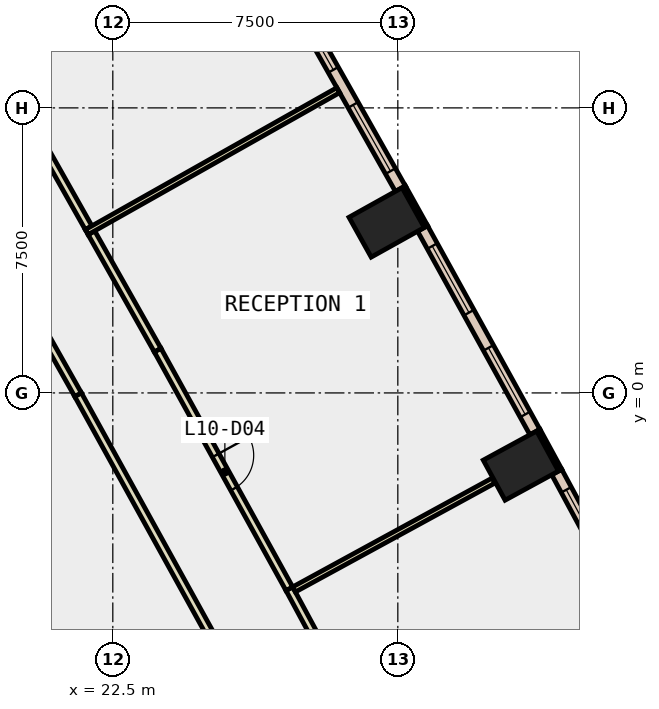
"""IFC4 building model, lengths in metres.
Left out: names, types, materials, properties, quantities, classifications, styles, units other than length and angle.
Written with IfcOpenShell. Run it as: python <this file> out.ifc"""

import sys

from ifc_helpers import new_model, si_unit, direction, frame, frame_2d, origin, origin_2d, place, context, subcontext, project, spatial, rectangle, extrude, element, fill, save


model = new_model("IFC4")
c1 = context("Model", 3, precision=1e-05, world=origin(), true_north=direction((0.0, 1.0)))
c2 = subcontext(c1, "Body", "Model", "MODEL_VIEW")
j1 = project(units=[si_unit("LENGTHUNIT", "METRE"), si_unit("PLANEANGLEUNIT", "RADIAN")], contexts=[c1])
p1 = place(None, origin())
s1 = spatial("IfcSite", under=j1, at=p1, CompositionType="ELEMENT")
p2 = place(p1, origin())
s2 = spatial("IfcBuilding", under=s1, at=p2, CompositionType="ELEMENT")
p3 = place(p2, frame((0.0, 0.0, 51.8)))
s3 = spatial("IfcBuildingStorey", under=s2, at=p3, CompositionType="ELEMENT", Elevation=51.8)
for number, where, z_axis, x_axis in (
    (1, (33.238, -1.913, -0.4), (0.0, 0.0, 1.0), (-0.478, 0.878, 0.0)),
    (2, (29.706, 4.487, -0.4), (0.0, 0.0, 1.0), (-0.487, 0.873, 0.0)),
):
    element("IfcColumn", number, at=place(p3, frame(where, z_axis=z_axis, x_axis=x_axis)), inside=s3, PredefinedType="COLUMN", context=c2, shape_type="SweptSolid", body=[
        extrude(rectangle(XDim=1.2, YDim=1.6, at=origin_2d()), origin(), (0.0, 0.0, 1.0), 4.2),
    ])
p4 = place(p3, frame((34.271, -2.034, 0.0), z_axis=(0.0, 0.0, 1.0), x_axis=(-0.478267644701, 0.878214131082, 0.0)))
e3 = element("IfcWall", 3, at=p4, inside=s3, PredefinedType="STANDARD", context=c2, shape_type="SweptSolid", body=[
    extrude(rectangle(XDim=1.2, YDim=0.1, at=frame_2d((0.6, 0.0))), origin(), (0.0, 0.0, 1.0), 3.8),
])
p5 = place(p3, frame((30.74, 4.377, 0.0), z_axis=(0.0, 0.0, 1.0), x_axis=(-0.486730996044, 0.87355190887, 0.0)))
e4 = element("IfcWall", 4, at=p5, inside=s3, PredefinedType="STANDARD", context=c2, shape_type="SweptSolid", body=[
    extrude(rectangle(XDim=1.2, YDim=0.1, at=frame_2d((0.6, 0.0))), origin(), (0.0, 0.0, 1.0), 3.8),
])
p6 = place(p3, frame((37.086, -7.47, 0.0), z_axis=(0.0, 0.0, 1.0), x_axis=(-0.474584950749, 0.880209704856, 0.0)))
e5 = element("IfcWall", 5, at=p6, inside=s3, PredefinedType="STANDARD", context=c2, shape_type="SweptSolid", body=[
    extrude(rectangle(XDim=6.121, YDim=0.3, at=frame_2d((3.061, 0.0))), origin(), (0.0, 0.0, 1.0), 3.8),
])
p7 = place(p6, frame((0.53, 0.0, 0.9)))
e6 = element("IfcOpeningElement", 6, at=p7, cuts=e5, PredefinedType="OPENING", context=c2, shape_type="SweptSolid", body=[
    extrude(rectangle(XDim=2.0, YDim=2.6, at=frame_2d((1.0, 1.3))), frame((0.0, 0.16, 0.0), z_axis=(0.0, -1.0, 0.0), x_axis=(1.0, 0.0, 0.0)), (0.0, 0.0, 1.0), 0.32),
])
p8 = place(p6, frame((3.591, 0.0, 0.9)))
e7 = element("IfcOpeningElement", 7, at=p8, cuts=e5, PredefinedType="OPENING", context=c2, shape_type="SweptSolid", body=[
    extrude(rectangle(XDim=2.0, YDim=2.6, at=frame_2d((1.0, 1.3))), frame((0.0, 0.16, 0.0), z_axis=(0.0, -1.0, 0.0), x_axis=(1.0, 0.0, 0.0)), (0.0, 0.0, 1.0), 0.32),
])
p9 = place(p3, frame((33.607, -1.03, 0.0), z_axis=(0.0, 0.0, 1.0), x_axis=(-0.483195456594, 0.875512507465, 0.0)))
e8 = element("IfcWall", 8, at=p9, inside=s3, PredefinedType="STANDARD", context=c2, shape_type="SweptSolid", body=[
    extrude(rectangle(XDim=6.12, YDim=0.3, at=frame_2d((3.06, 0.0))), origin(), (0.0, 0.0, 1.0), 3.8),
])
p10 = place(p9, frame((0.53, 0.0, 0.9)))
e9 = element("IfcOpeningElement", 9, at=p10, cuts=e8, PredefinedType="OPENING", context=c2, shape_type="SweptSolid", body=[
    extrude(rectangle(XDim=2.0, YDim=2.6, at=frame_2d((1.0, 1.3))), frame((0.0, 0.16, 0.0), z_axis=(0.0, -1.0, 0.0), x_axis=(1.0, 0.0, 0.0)), (0.0, 0.0, 1.0), 0.32),
])
p11 = place(p9, frame((3.59, 0.0, 0.9)))
e10 = element("IfcOpeningElement", 10, at=p11, cuts=e8, PredefinedType="OPENING", context=c2, shape_type="SweptSolid", body=[
    extrude(rectangle(XDim=2.0, YDim=2.6, at=frame_2d((1.0, 1.3))), frame((0.0, 0.16, 0.0), z_axis=(0.0, -1.0, 0.0), x_axis=(1.0, 0.0, 0.0)), (0.0, 0.0, 1.0), 0.32),
])
p12 = place(p3, frame((30.067, 5.374, 0.0), z_axis=(0.0, 0.0, 1.0), x_axis=(-0.49151046248, 0.870871669807, 0.0)))
e11 = element("IfcWall", 11, at=p12, inside=s3, PredefinedType="STANDARD", context=c2, shape_type="SweptSolid", body=[
    extrude(rectangle(XDim=6.122, YDim=0.3, at=frame_2d((3.061, 0.0))), origin(), (0.0, 0.0, 1.0), 3.8),
])
p13 = place(p12, frame((0.53, 0.0, 0.9)))
e12 = element("IfcOpeningElement", 12, at=p13, cuts=e11, PredefinedType="OPENING", context=c2, shape_type="SweptSolid", body=[
    extrude(rectangle(XDim=2.0, YDim=2.6, at=frame_2d((1.0, 1.3))), frame((0.0, 0.16, 0.0), z_axis=(0.0, -1.0, 0.0), x_axis=(1.0, 0.0, 0.0)), (0.0, 0.0, 1.0), 0.32),
])
p14 = place(p12, frame((3.591, 0.0, 0.9)))
e13 = element("IfcOpeningElement", 13, at=p14, cuts=e11, PredefinedType="OPENING", context=c2, shape_type="SweptSolid", body=[
    extrude(rectangle(XDim=2.0, YDim=2.6, at=frame_2d((1.0, 1.3))), frame((0.0, 0.16, 0.0), z_axis=(0.0, -1.0, 0.0), x_axis=(1.0, 0.0, 0.0)), (0.0, 0.0, 1.0), 0.32),
])
p15 = place(p3, frame((25.074, -6.368, 0.0), z_axis=(0.0, 0.0, 1.0), x_axis=(-0.483126495407, 0.875550563609, 0.0)))
e14 = element("IfcWall", 14, at=p15, inside=s3, PredefinedType="PARTITIONING", context=c2, shape_type="SweptSolid", body=[
    extrude(rectangle(XDim=7.222, YDim=0.2, at=frame_2d((3.611, 0.0))), origin(), (0.0, 0.0, 1.0), 3.8),
])
p16 = place(p3, frame((21.585, -0.045, 0.0), z_axis=(0.0, 0.0, 1.0), x_axis=(-0.491542684896, 0.870853483042, 0.0)))
e15 = element("IfcWall", 15, at=p16, inside=s3, PredefinedType="PARTITIONING", context=c2, shape_type="SweptSolid", body=[
    extrude(rectangle(XDim=4.738, YDim=0.2, at=frame_2d((2.369, 0.0))), origin(), (0.0, 0.0, 1.0), 3.8),
])
p17 = place(p3, frame((27.145, -5.152, 0.0), z_axis=(0.0, 0.0, 1.0), x_axis=(0.474591029089, -0.880206427554, 0.0)))
e16 = element("IfcWall", 16, at=p17, inside=s3, PredefinedType="PARTITIONING", context=c2, shape_type="SweptSolid", body=[
    extrude(rectangle(XDim=7.32, YDim=0.2, at=frame_2d((3.66, 0.0))), origin(), (0.0, 0.0, 1.0), 3.8),
])
p18 = place(p17, frame((3.235, 0.0, 0.0)))
e17 = element("IfcOpeningElement", 17, at=p18, cuts=e16, PredefinedType="OPENING", context=c2, shape_type="SweptSolid", body=[
    extrude(rectangle(XDim=1.0, YDim=2.1, at=frame_2d((0.5, 1.05))), frame((0.0, 0.11, 0.0), z_axis=(0.0, -1.0, 0.0), x_axis=(1.0, 0.0, 0.0)), (0.0, 0.0, 1.0), 0.22),
])
p19 = place(p3, frame((21.937, 4.214, 0.0), z_axis=(0.0, 0.0, 1.0), x_axis=(0.491485799319, -0.870885588965, 0.0)))
e18 = element("IfcWall", 18, at=p19, inside=s3, PredefinedType="PARTITIONING", context=c2, shape_type="SweptSolid", body=[
    extrude(rectangle(XDim=3.548, YDim=0.2, at=frame_2d((1.774, 0.0))), origin(), (0.0, 0.0, 1.0), 3.8),
])
p20 = place(p3, frame((23.681, 1.124, 0.0), z_axis=(0.0, 0.0, 1.0), x_axis=(0.483125061868, -0.875551354631, 0.0)))
e19 = element("IfcWall", 19, at=p20, inside=s3, PredefinedType="PARTITIONING", context=c2, shape_type="SweptSolid", body=[
    extrude(rectangle(XDim=7.168, YDim=0.2, at=frame_2d((3.584, 0.0))), origin(), (0.0, 0.0, 1.0), 3.8),
])
p21 = place(p20, frame((3.159, 0.0, 0.0)))
e20 = element("IfcOpeningElement", 20, at=p21, cuts=e19, PredefinedType="OPENING", context=c2, shape_type="SweptSolid", body=[
    extrude(rectangle(XDim=1.0, YDim=2.1, at=frame_2d((0.5, 1.05))), frame((0.0, 0.11, 0.0), z_axis=(0.0, -1.0, 0.0), x_axis=(1.0, 0.0, 0.0)), (0.0, 0.0, 1.0), 0.22),
])
p22 = place(p3, frame((20.12, 7.434, 0.0), z_axis=(0.0, 0.0, 1.0), x_axis=(0.491394823876, -0.87093692485, 0.0)))
e21 = element("IfcWall", 21, at=p22, inside=s3, PredefinedType="PARTITIONING", context=c2, shape_type="SweptSolid", body=[
    extrude(rectangle(XDim=3.547, YDim=0.2, at=frame_2d((1.773, 0.0))), origin(), (0.0, 0.0, 1.0), 3.8),
])
p23 = place(p3, frame((27.268, -5.171, 0.0), z_axis=(0.0, 0.0, 1.0), x_axis=(0.877837854343, 0.478957932895, 0.0)))
e22 = element("IfcWall", 22, at=p23, inside=s3, PredefinedType="PARTITIONING", context=c2, shape_type="SweptSolid", body=[
    extrude(rectangle(XDim=5.982, YDim=0.15, at=frame_2d((2.991, 0.0))), origin(), (0.0, 0.0, 1.0), 3.8),
])
p24 = place(p3, frame((21.813, 4.231, 0.0), z_axis=(0.0, 0.0, 1.0), x_axis=(0.870901264369, 0.491458022337, 0.0)))
e23 = element("IfcWall", 23, at=p24, inside=s3, PredefinedType="PARTITIONING", context=c2, shape_type="SweptSolid", body=[
    extrude(rectangle(XDim=7.6, YDim=0.15, at=frame_2d((3.8, 0.0))), origin(), (0.0, 0.0, 1.0), 3.8),
])
p25 = place(p8, origin())
e24 = element("IfcWindow", 24, at=p25, inside=s3, PartitioningType="SINGLE_PANEL", PredefinedType="WINDOW", context=c2, shape_type="SweptSolid", body=[
    extrude(rectangle(XDim=2.0, YDim=2.6, at=frame_2d((1.0, 1.3))), frame((0.0, 0.03, 0.0), z_axis=(0.0, -1.0, 0.0), x_axis=(1.0, 0.0, 0.0)), (0.0, 0.0, 1.0), 0.06),
])
fill(e7, e24)
p26 = place(p10, origin())
e25 = element("IfcWindow", 25, at=p26, inside=s3, PartitioningType="SINGLE_PANEL", PredefinedType="WINDOW", context=c2, shape_type="SweptSolid", body=[
    extrude(rectangle(XDim=2.0, YDim=2.6, at=frame_2d((1.0, 1.3))), frame((0.0, 0.03, 0.0), z_axis=(0.0, -1.0, 0.0), x_axis=(1.0, 0.0, 0.0)), (0.0, 0.0, 1.0), 0.06),
])
fill(e9, e25)
p27 = place(p11, origin())
e26 = element("IfcWindow", 26, at=p27, inside=s3, PartitioningType="SINGLE_PANEL", PredefinedType="WINDOW", context=c2, shape_type="SweptSolid", body=[
    extrude(rectangle(XDim=2.0, YDim=2.6, at=frame_2d((1.0, 1.3))), frame((0.0, 0.03, 0.0), z_axis=(0.0, -1.0, 0.0), x_axis=(1.0, 0.0, 0.0)), (0.0, 0.0, 1.0), 0.06),
])
fill(e10, e26)
p28 = place(p13, origin())
e27 = element("IfcWindow", 27, at=p28, inside=s3, PartitioningType="SINGLE_PANEL", PredefinedType="WINDOW", context=c2, shape_type="SweptSolid", body=[
    extrude(rectangle(XDim=2.0, YDim=2.6, at=frame_2d((1.0, 1.3))), frame((0.0, 0.03, 0.0), z_axis=(0.0, -1.0, 0.0), x_axis=(1.0, 0.0, 0.0)), (0.0, 0.0, 1.0), 0.06),
])
fill(e12, e27)
p29 = place(p14, origin())
e28 = element("IfcWindow", 28, at=p29, inside=s3, PartitioningType="SINGLE_PANEL", PredefinedType="WINDOW", context=c2, shape_type="SweptSolid", body=[
    extrude(rectangle(XDim=2.0, YDim=2.6, at=frame_2d((1.0, 1.3))), frame((0.0, 0.03, 0.0), z_axis=(0.0, -1.0, 0.0), x_axis=(1.0, 0.0, 0.0)), (0.0, 0.0, 1.0), 0.06),
])
fill(e13, e28)
p30 = place(p21, origin())
e29 = element("IfcDoor", 29, at=p30, inside=s3, OperationType="SINGLE_SWING_LEFT", PredefinedType="DOOR", context=c2, shape_type="SweptSolid", body=[
    extrude(rectangle(XDim=1.0, YDim=2.1, at=frame_2d((0.5, 1.05))), frame((0.0, 0.025, 0.0), z_axis=(0.0, -1.0, 0.0), x_axis=(1.0, 0.0, 0.0)), (0.0, 0.0, 1.0), 0.05),
])
fill(e20, e29)
save(model, sys.argv[1])
